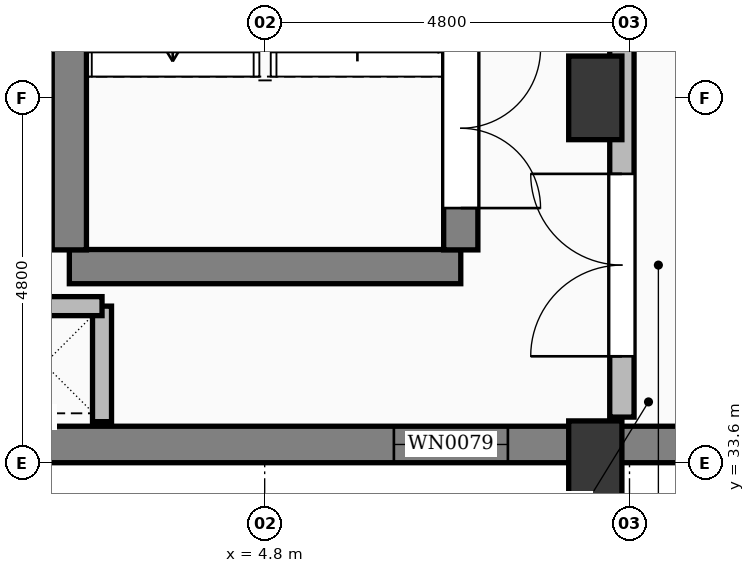
"""IFC4 building model, lengths in metres.
Left out: names, types, materials, properties, quantities, classifications, styles, units other than length and angle.
Written with IfcOpenShell. Run it as: python <this file> out.ifc"""

import sys

from ifc_helpers import new_model, si_unit, direction, frame, frame_2d, origin, origin_2d, place, context, subcontext, project, spatial, rectangle, extrude, element, fill, save


model = new_model("IFC4")
c1 = context("Model", 3, precision=1e-05, world=origin(), true_north=direction((0.0, 1.0)))
c2 = subcontext(c1, "Body", "Model", "MODEL_VIEW")
j1 = project(units=[si_unit("LENGTHUNIT", "METRE"), si_unit("PLANEANGLEUNIT", "RADIAN")], contexts=[c1])
p1 = place(None, origin())
s1 = spatial("IfcSite", under=j1, at=p1, CompositionType="ELEMENT")
p2 = place(p1, origin())
s2 = spatial("IfcBuilding", under=s1, at=p2, CompositionType="ELEMENT")
p3 = place(p2, frame((0.0, 0.0, 11.4)))
s3 = spatial("IfcBuildingStorey", under=s2, at=p3, CompositionType="ELEMENT", Elevation=11.4)
for number, where, z_axis, x_axis in (
    (1, (9.15, 33.6, 0.0), (0.0, 0.0, 1.0), (1.0, 0.0, 0.0)),
    (2, (9.15, 38.4, 0.0), (0.0, 0.0, 1.0), (1.0, 0.0, 0.0)),
):
    element("IfcColumn", number, at=place(p3, frame(where, z_axis=z_axis, x_axis=x_axis)), inside=s3, PredefinedType="COLUMN", context=c2, shape_type="SweptSolid", body=[
        extrude(rectangle(XDim=0.7, YDim=1.1, at=origin_2d()), origin(), (0.0, 0.0, 1.0), 4.8),
    ])
p4 = place(p3, frame((0.5, 33.84, 0.0), z_axis=(0.0, 0.0, 1.0), x_axis=(1.0, 0.0, 0.0)))
e3 = element("IfcWall", 3, at=p4, inside=s3, PredefinedType="SOLIDWALL", context=c2, shape_type="SweptSolid", body=[
    extrude(rectangle(XDim=56.7, YDim=0.48, at=frame_2d((28.35, 0.0))), origin(), (0.0, 0.0, 1.0), 4.8),
])
p5 = place(p4, frame((6.0, 0.0, 0.9)))
e4 = element("IfcOpeningElement", 4, at=p5, cuts=e3, PredefinedType="OPENING", context=c2, shape_type="SweptSolid", body=[
    extrude(rectangle(XDim=1.5, YDim=1.74, at=frame_2d((0.75, 0.87))), frame((0.0, 0.252, 0.0), z_axis=(0.0, -1.0, 0.0), x_axis=(1.0, 0.0, 0.0)), (0.0, 0.0, 1.0), 0.504),
])
p6 = place(p4, frame((15.6, 0.0, 0.9)))
e5 = element("IfcOpeningElement", 5, at=p6, cuts=e3, PredefinedType="OPENING", context=c2, shape_type="SweptSolid", body=[
    extrude(rectangle(XDim=1.5, YDim=1.74, at=frame_2d((0.75, 0.87))), frame((0.0, 0.252, 0.0), z_axis=(0.0, -1.0, 0.0), x_axis=(1.0, 0.0, 0.0)), (0.0, 0.0, 1.0), 0.504),
])
p7 = place(p4, frame((25.2, 0.0, 0.9)))
e6 = element("IfcOpeningElement", 6, at=p7, cuts=e3, PredefinedType="OPENING", context=c2, shape_type="SweptSolid", body=[
    extrude(rectangle(XDim=1.5, YDim=1.74, at=frame_2d((0.75, 0.87))), frame((0.0, 0.252, 0.0), z_axis=(0.0, -1.0, 0.0), x_axis=(1.0, 0.0, 0.0)), (0.0, 0.0, 1.0), 0.504),
])
p8 = place(p4, frame((34.8, 0.0, 0.9)))
e7 = element("IfcOpeningElement", 7, at=p8, cuts=e3, PredefinedType="OPENING", context=c2, shape_type="SweptSolid", body=[
    extrude(rectangle(XDim=1.5, YDim=1.74, at=frame_2d((0.75, 0.87))), frame((0.0, 0.252, 0.0), z_axis=(0.0, -1.0, 0.0), x_axis=(1.0, 0.0, 0.0)), (0.0, 0.0, 1.0), 0.504),
])
p9 = place(p4, frame((44.4, 0.0, 0.9)))
e8 = element("IfcOpeningElement", 8, at=p9, cuts=e3, PredefinedType="OPENING", context=c2, shape_type="SweptSolid", body=[
    extrude(rectangle(XDim=1.5, YDim=1.74, at=frame_2d((0.75, 0.87))), frame((0.0, 0.252, 0.0), z_axis=(0.0, -1.0, 0.0), x_axis=(1.0, 0.0, 0.0)), (0.0, 0.0, 1.0), 0.504),
])
p10 = place(p3, frame((2.23, 36.18, 0.0), z_axis=(0.0, 0.0, 1.0), x_axis=(1.0, 0.0, 0.0)))
e9 = element("IfcWall", 9, at=p10, inside=s3, PredefinedType="SHEAR", context=c2, shape_type="SweptSolid", body=[
    extrude(rectangle(XDim=5.15, YDim=0.45, at=frame_2d((2.575, 0.0))), origin(), (0.0, 0.0, 1.0), 4.42),
])
p11 = place(p3, frame((2.23, 36.4, 0.0), z_axis=(0.0, 0.0, 1.0), x_axis=(0.0, 1.0, 0.0)))
e10 = element("IfcWall", 10, at=p11, inside=s3, PredefinedType="SHEAR", context=c2, shape_type="SweptSolid", body=[
    extrude(rectangle(XDim=12.0, YDim=0.45, at=frame_2d((6.0, 0.0))), origin(), (0.0, 0.0, 1.0), 4.42),
])
p12 = place(p3, frame((7.38, 36.4, 0.0), z_axis=(0.0, 0.0, 1.0), x_axis=(0.0, 1.0, 0.0)))
e11 = element("IfcWall", 11, at=p12, inside=s3, PredefinedType="SHEAR", context=c2, shape_type="SweptSolid", body=[
    extrude(rectangle(XDim=12.0, YDim=0.45, at=frame_2d((6.0, 0.0))), origin(), (0.0, 0.0, 1.0), 4.42),
])
p13 = place(p12, frame((0.55, 0.0, 0.0)))
e12 = element("IfcOpeningElement", 12, at=p13, cuts=e11, PredefinedType="OPENING", context=c2, shape_type="SweptSolid", body=[
    extrude(rectangle(XDim=2.1, YDim=2.2, at=frame_2d((1.05, 1.1))), frame((0.0, 0.237, 0.0), z_axis=(0.0, -1.0, 0.0), x_axis=(1.0, 0.0, 0.0)), (0.0, 0.0, 1.0), 0.474),
])
for number, where, z_axis, x_axis in (
    (13, (2.66, 34.14, 0.0), (0.0, 0.0, 1.0), (0.0, 1.0, 0.0)),
    (14, (2.66, 35.66, 0.0), (0.0, 0.0, 1.0), (-1.0, 0.0, 0.0)),
):
    element("IfcWall", number, at=place(p3, frame(where, z_axis=z_axis, x_axis=x_axis)), inside=s3, PredefinedType="SOLIDWALL", context=c2, shape_type="SweptSolid", body=[
        extrude(rectangle(XDim=1.52, YDim=0.25, at=frame_2d((0.76, 0.0))), origin(), (0.0, 0.0, 1.0), 4.42),
    ])
p14 = place(p3, frame((9.5, 34.2, 0.0), z_axis=(0.0, 0.0, 1.0), x_axis=(0.0, 1.0, 0.0)))
e15 = element("IfcWall", 15, at=p14, inside=s3, PredefinedType="SOLIDWALL", context=c2, shape_type="SweptSolid", body=[
    extrude(rectangle(XDim=51.6, YDim=0.32, at=frame_2d((25.8, 0.0))), origin(), (0.0, 0.0, 1.0), 3.692),
])
p15 = place(p14, frame((0.8, 0.0, 0.0)))
e16 = element("IfcOpeningElement", 16, at=p15, cuts=e15, PredefinedType="OPENING", context=c2, shape_type="SweptSolid", body=[
    extrude(rectangle(XDim=2.4, YDim=2.5, at=frame_2d((1.2, 1.25))), frame((0.0, 0.172, 0.0), z_axis=(0.0, -1.0, 0.0), x_axis=(1.0, 0.0, 0.0)), (0.0, 0.0, 1.0), 0.344),
])
p16 = place(p14, frame((11.325, 0.0, 0.95)))
e17 = element("IfcOpeningElement", 17, at=p16, cuts=e15, PredefinedType="OPENING", context=c2, shape_type="SweptSolid", body=[
    extrude(rectangle(XDim=1.4, YDim=1.1, at=frame_2d((0.7, 0.55))), frame((0.0, 0.172, 0.0), z_axis=(0.0, -1.0, 0.0), x_axis=(1.0, 0.0, 0.0)), (0.0, 0.0, 1.0), 0.344),
])
p17 = place(p14, frame((15.5, 0.0, 0.95)))
e18 = element("IfcOpeningElement", 18, at=p17, cuts=e15, PredefinedType="OPENING", context=c2, shape_type="SweptSolid", body=[
    extrude(rectangle(XDim=1.4, YDim=1.1, at=frame_2d((0.7, 0.55))), frame((0.0, 0.172, 0.0), z_axis=(0.0, -1.0, 0.0), x_axis=(1.0, 0.0, 0.0)), (0.0, 0.0, 1.0), 0.344),
])
p18 = place(p14, frame((20.3, 0.0, 0.95)))
e19 = element("IfcOpeningElement", 19, at=p18, cuts=e15, PredefinedType="OPENING", context=c2, shape_type="SweptSolid", body=[
    extrude(rectangle(XDim=1.4, YDim=1.1, at=frame_2d((0.7, 0.55))), frame((0.0, 0.172, 0.0), z_axis=(0.0, -1.0, 0.0), x_axis=(1.0, 0.0, 0.0)), (0.0, 0.0, 1.0), 0.344),
])
p19 = place(p14, frame((25.1, 0.0, 0.95)))
e20 = element("IfcOpeningElement", 20, at=p19, cuts=e15, PredefinedType="OPENING", context=c2, shape_type="SweptSolid", body=[
    extrude(rectangle(XDim=1.4, YDim=1.1, at=frame_2d((0.7, 0.55))), frame((0.0, 0.172, 0.0), z_axis=(0.0, -1.0, 0.0), x_axis=(1.0, 0.0, 0.0)), (0.0, 0.0, 1.0), 0.344),
])
p20 = place(p14, frame((29.9, 0.0, 0.95)))
e21 = element("IfcOpeningElement", 21, at=p20, cuts=e15, PredefinedType="OPENING", context=c2, shape_type="SweptSolid", body=[
    extrude(rectangle(XDim=1.4, YDim=1.1, at=frame_2d((0.7, 0.55))), frame((0.0, 0.172, 0.0), z_axis=(0.0, -1.0, 0.0), x_axis=(1.0, 0.0, 0.0)), (0.0, 0.0, 1.0), 0.344),
])
p21 = place(p14, frame((34.7, 0.0, 0.95)))
e22 = element("IfcOpeningElement", 22, at=p21, cuts=e15, PredefinedType="OPENING", context=c2, shape_type="SweptSolid", body=[
    extrude(rectangle(XDim=1.4, YDim=1.2, at=frame_2d((0.7, 0.6))), frame((0.0, 0.172, 0.0), z_axis=(0.0, -1.0, 0.0), x_axis=(1.0, 0.0, 0.0)), (0.0, 0.0, 1.0), 0.344),
])
p22 = place(p5, origin())
e23 = element("IfcWindow", 23, at=p22, inside=s3, PartitioningType="SINGLE_PANEL", PredefinedType="WINDOW", context=c2, shape_type="SweptSolid", body=[
    extrude(rectangle(XDim=1.5, YDim=1.74, at=frame_2d((0.75, 0.87))), frame((0.0, 0.03, 0.0), z_axis=(0.0, -1.0, 0.0), x_axis=(1.0, 0.0, 0.0)), (0.0, 0.0, 1.0), 0.06),
])
fill(e4, e23)
p23 = place(p13, frame((2.1, 0.0, 0.0), z_axis=(0.0, 0.0, 1.0), x_axis=(-1.0, 0.0, 0.0)))
e24 = element("IfcDoor", 24, at=p23, inside=s3, OperationType="DOUBLE_DOOR_SINGLE_SWING", PredefinedType="DOOR", context=c2, shape_type="SweptSolid", body=[
    extrude(rectangle(XDim=2.1, YDim=2.2, at=frame_2d((1.05, 1.1))), frame((0.0, 0.025, 0.0), z_axis=(0.0, -1.0, 0.0), x_axis=(1.0, 0.0, 0.0)), (0.0, 0.0, 1.0), 0.05),
])
fill(e12, e24)
p24 = place(p15, origin())
e25 = element("IfcDoor", 25, at=p24, inside=s3, OperationType="DOUBLE_DOOR_SINGLE_SWING", PredefinedType="DOOR", context=c2, shape_type="SweptSolid", body=[
    extrude(rectangle(XDim=2.4, YDim=2.5, at=frame_2d((1.2, 1.25))), frame((0.0, 0.025, 0.0), z_axis=(0.0, -1.0, 0.0), x_axis=(1.0, 0.0, 0.0)), (0.0, 0.0, 1.0), 0.05),
])
fill(e16, e25)
save(model, sys.argv[1])
